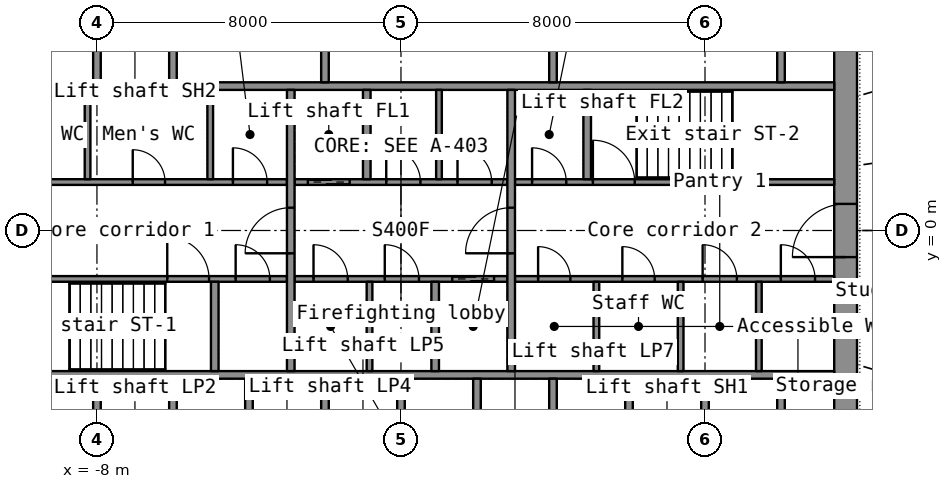
"""IFC4 building model, lengths in metres.
Left out: names, types, materials, properties, quantities, classifications, styles, units other than length and angle.
Written with IfcOpenShell. Run it as: python <this file> out.ifc"""

import sys

from ifc_helpers import new_model, si_unit, direction, frame, frame_2d, origin, place, context, subcontext, project, spatial, rectangle, extrude, element, fill, save


model = new_model("IFC4")
c1 = context("Model", 3, precision=1e-05, world=origin(), true_north=direction((0.0, 1.0)))
c2 = subcontext(c1, "Body", "Model", "MODEL_VIEW")
j1 = project(units=[si_unit("LENGTHUNIT", "METRE"), si_unit("PLANEANGLEUNIT", "RADIAN")], contexts=[c1])
p1 = place(None, origin())
s1 = spatial("IfcSite", under=j1, at=p1, CompositionType="ELEMENT")
p2 = place(p1, origin())
s2 = spatial("IfcBuilding", under=s1, at=p2, CompositionType="ELEMENT")
p3 = place(p2, frame((0.0, 0.0, 7.0)))
s3 = spatial("IfcBuildingStorey", under=s2, at=p3, CompositionType="ELEMENT", Elevation=7.0)
p4 = place(p3, frame((11.7, -7.2, 0.0), z_axis=(0.0, 0.0, 1.0), x_axis=(0.0, 1.0, 0.0)))
e1 = element("IfcWall", 1, at=p4, inside=s3, PredefinedType="SHEAR", context=c2, shape_type="SweptSolid", body=[
    extrude(rectangle(XDim=14.4, YDim=0.6, at=frame_2d((7.2, 0.0))), origin(), (0.0, 0.0, 1.0), 6.1),
])
p5 = place(p4, frame((6.5, 0.0, 0.0)))
e2 = element("IfcOpeningElement", 2, at=p5, cuts=e1, PredefinedType="OPENING", context=c2, shape_type="SweptSolid", body=[
    extrude(rectangle(XDim=1.4, YDim=2.2, at=frame_2d((0.7, 1.1))), frame((0.0, 0.31, 0.0), z_axis=(0.0, -1.0, 0.0), x_axis=(1.0, 0.0, 0.0)), (0.0, 0.0, 1.0), 0.62),
])
for number, where, z_axis, x_axis in (
    (3, (-11.4, -3.8, 0.0), (0.0, 0.0, 1.0), (1.0, 0.0, 0.0)),
    (4, (-11.4, 3.8, 0.0), (0.0, 0.0, 1.0), (1.0, 0.0, 0.0)),
):
    element("IfcWall", number, at=place(p3, frame(where, z_axis=z_axis, x_axis=x_axis)), inside=s3, PredefinedType="SHEAR", context=c2, shape_type="SweptSolid", body=[
        extrude(rectangle(XDim=22.8, YDim=0.2, at=frame_2d((11.4, 0.0))), origin(), (0.0, 0.0, 1.0), 6.1),
    ])
for number, where, z_axis, x_axis in (
    (5, (-8.0, -6.6, 0.0), (0.0, 0.0, 1.0), (0.0, 1.0, 0.0)),
    (6, (-6.0, -6.6, 0.0), (0.0, 0.0, 1.0), (0.0, 1.0, 0.0)),
    (7, (-4.0, -6.6, 0.0), (0.0, 0.0, 1.0), (0.0, 1.0, 0.0)),
    (8, (-2.0, -6.6, 0.0), (0.0, 0.0, 1.0), (0.0, 1.0, 0.0)),
    (9, (0.0, -6.6, 0.0), (0.0, 0.0, 1.0), (0.0, 1.0, 0.0)),
    (10, (2.0, -6.6, 0.0), (0.0, 0.0, 1.0), (0.0, 1.0, 0.0)),
    (11, (4.0, -6.6, 0.0), (0.0, 0.0, 1.0), (0.0, 1.0, 0.0)),
    (12, (6.0, -6.6, 0.0), (0.0, 0.0, 1.0), (0.0, 1.0, 0.0)),
    (13, (8.0, -6.6, 0.0), (0.0, 0.0, 1.0), (0.0, 1.0, 0.0)),
    (14, (10.0, -6.6, 0.0), (0.0, 0.0, 1.0), (0.0, 1.0, 0.0)),
    (15, (-8.0, 3.9, 0.0), (0.0, 0.0, 1.0), (0.0, 1.0, 0.0)),
    (16, (-6.0, 3.9, 0.0), (0.0, 0.0, 1.0), (0.0, 1.0, 0.0)),
    (17, (10.0, 3.9, 0.0), (0.0, 0.0, 1.0), (0.0, 1.0, 0.0)),
):
    element("IfcWall", number, at=place(p3, frame(where, z_axis=z_axis, x_axis=x_axis)), inside=s3, PredefinedType="SHEAR", context=c2, shape_type="SweptSolid", body=[
        extrude(rectangle(XDim=2.7, YDim=0.2, at=frame_2d((1.35, 0.0))), origin(), (0.0, 0.0, 1.0), 6.1),
    ])
for number, where, z_axis, x_axis in (
    (18, (-2.0, 3.9, 0.0), (0.0, 0.0, 1.0), (0.0, 1.0, 0.0)),
    (19, (4.0, 3.9, 0.0), (0.0, 0.0, 1.0), (0.0, 1.0, 0.0)),
):
    element("IfcWall", number, at=place(p3, frame(where, z_axis=z_axis, x_axis=x_axis)), inside=s3, PredefinedType="PARTITIONING", context=c2, shape_type="SweptSolid", body=[
        extrude(rectangle(XDim=2.7, YDim=0.2, at=frame_2d((1.35, 0.0))), origin(), (0.0, 0.0, 1.0), 6.1),
    ])
p6 = place(p3, frame((-11.4, -1.275, 0.0), z_axis=(0.0, 0.0, 1.0), x_axis=(1.0, 0.0, 0.0)))
e20 = element("IfcWall", 20, at=p6, inside=s3, PredefinedType="SHEAR", context=c2, shape_type="SweptSolid", body=[
    extrude(rectangle(XDim=8.4, YDim=0.15, at=frame_2d((4.2, 0.0))), origin(), (0.0, 0.0, 1.0), 6.1),
])
p7 = place(p6, frame((5.25, 0.0, 0.0)))
e21 = element("IfcOpeningElement", 21, at=p7, cuts=e20, PredefinedType="OPENING", context=c2, shape_type="SweptSolid", body=[
    extrude(rectangle(XDim=1.1, YDim=2.15, at=frame_2d((0.55, 1.075))), frame((0.0, 0.085, 0.0), z_axis=(0.0, -1.0, 0.0), x_axis=(1.0, 0.0, 0.0)), (0.0, 0.0, 1.0), 0.17),
])
p8 = place(p6, frame((7.05, 0.0, 0.0)))
e22 = element("IfcOpeningElement", 22, at=p8, cuts=e20, PredefinedType="OPENING", context=c2, shape_type="SweptSolid", body=[
    extrude(rectangle(XDim=0.9, YDim=2.1, at=frame_2d((0.45, 1.05))), frame((0.0, 0.085, 0.0), z_axis=(0.0, -1.0, 0.0), x_axis=(1.0, 0.0, 0.0)), (0.0, 0.0, 1.0), 0.17),
])
p9 = place(p3, frame((-2.8, -1.275, 0.0), z_axis=(0.0, 0.0, 1.0), x_axis=(1.0, 0.0, 0.0)))
e23 = element("IfcWall", 23, at=p9, inside=s3, PredefinedType="SHEAR", context=c2, shape_type="SweptSolid", body=[
    extrude(rectangle(XDim=5.6, YDim=0.15, at=frame_2d((2.8, 0.0))), origin(), (0.0, 0.0, 1.0), 6.1),
])
p10 = place(p9, frame((4.15, 0.0, 0.0)))
e24 = element("IfcOpeningElement", 24, at=p10, cuts=e23, PredefinedType="OPENING", context=c2, shape_type="SweptSolid", body=[
    extrude(rectangle(XDim=1.1, YDim=2.2, at=frame_2d((0.55, 1.1))), frame((0.0, 0.085, 0.0), z_axis=(0.0, -1.0, 0.0), x_axis=(1.0, 0.0, 0.0)), (0.0, 0.0, 1.0), 0.17),
])
p11 = place(p9, frame((0.499, 0.0, 0.0)))
e25 = element("IfcOpeningElement", 25, at=p11, cuts=e23, PredefinedType="OPENING", context=c2, shape_type="SweptSolid", body=[
    extrude(rectangle(XDim=0.9, YDim=2.1, at=frame_2d((0.45, 1.05))), frame((0.0, 0.085, 0.0), z_axis=(0.0, -1.0, 0.0), x_axis=(1.0, 0.0, 0.0)), (0.0, 0.0, 1.0), 0.17),
])
p12 = place(p9, frame((2.374, 0.0, 0.0)))
e26 = element("IfcOpeningElement", 26, at=p12, cuts=e23, PredefinedType="OPENING", context=c2, shape_type="SweptSolid", body=[
    extrude(rectangle(XDim=0.9, YDim=2.1, at=frame_2d((0.45, 1.05))), frame((0.0, 0.085, 0.0), z_axis=(0.0, -1.0, 0.0), x_axis=(1.0, 0.0, 0.0)), (0.0, 0.0, 1.0), 0.17),
])
p13 = place(p3, frame((3.0, -1.275, 0.0), z_axis=(0.0, 0.0, 1.0), x_axis=(1.0, 0.0, 0.0)))
e27 = element("IfcWall", 27, at=p13, inside=s3, PredefinedType="PARTITIONING", context=c2, shape_type="SweptSolid", body=[
    extrude(rectangle(XDim=8.4, YDim=0.15, at=frame_2d((4.2, 0.0))), origin(), (0.0, 0.0, 1.0), 6.1),
])
p14 = place(p13, frame((0.608, 0.0, 0.0)))
e28 = element("IfcOpeningElement", 28, at=p14, cuts=e27, PredefinedType="OPENING", context=c2, shape_type="SweptSolid", body=[
    extrude(rectangle(XDim=0.85, YDim=2.1, at=frame_2d((0.425, 1.05))), frame((0.0, 0.085, 0.0), z_axis=(0.0, -1.0, 0.0), x_axis=(1.0, 0.0, 0.0)), (0.0, 0.0, 1.0), 0.17),
])
p15 = place(p13, frame((2.825, 0.0, 0.0)))
e29 = element("IfcOpeningElement", 29, at=p15, cuts=e27, PredefinedType="OPENING", context=c2, shape_type="SweptSolid", body=[
    extrude(rectangle(XDim=0.85, YDim=2.1, at=frame_2d((0.425, 1.05))), frame((0.0, 0.085, 0.0), z_axis=(0.0, -1.0, 0.0), x_axis=(1.0, 0.0, 0.0)), (0.0, 0.0, 1.0), 0.17),
])
p16 = place(p13, frame((4.938, 0.0, 0.0)))
e30 = element("IfcOpeningElement", 30, at=p16, cuts=e27, PredefinedType="OPENING", context=c2, shape_type="SweptSolid", body=[
    extrude(rectangle(XDim=0.9, YDim=2.1, at=frame_2d((0.45, 1.05))), frame((0.0, 0.085, 0.0), z_axis=(0.0, -1.0, 0.0), x_axis=(1.0, 0.0, 0.0)), (0.0, 0.0, 1.0), 0.17),
])
p17 = place(p13, frame((6.996, 0.0, 0.0)))
e31 = element("IfcOpeningElement", 31, at=p17, cuts=e27, PredefinedType="OPENING", context=c2, shape_type="SweptSolid", body=[
    extrude(rectangle(XDim=0.9, YDim=2.1, at=frame_2d((0.45, 1.05))), frame((0.0, 0.085, 0.0), z_axis=(0.0, -1.0, 0.0), x_axis=(1.0, 0.0, 0.0)), (0.0, 0.0, 1.0), 0.17),
])
p18 = place(p3, frame((-11.4, 1.275, 0.0), z_axis=(0.0, 0.0, 1.0), x_axis=(1.0, 0.0, 0.0)))
e32 = element("IfcWall", 32, at=p18, inside=s3, PredefinedType="PARTITIONING", context=c2, shape_type="SweptSolid", body=[
    extrude(rectangle(XDim=8.4, YDim=0.15, at=frame_2d((4.2, 0.0))), origin(), (0.0, 0.0, 1.0), 6.1),
])
p19 = place(p18, frame((1.114, 0.0, 0.0)))
e33 = element("IfcOpeningElement", 33, at=p19, cuts=e32, PredefinedType="OPENING", context=c2, shape_type="SweptSolid", body=[
    extrude(rectangle(XDim=0.85, YDim=2.1, at=frame_2d((0.425, 1.05))), frame((0.0, 0.085, 0.0), z_axis=(0.0, -1.0, 0.0), x_axis=(1.0, 0.0, 0.0)), (0.0, 0.0, 1.0), 0.17),
])
p20 = place(p18, frame((4.342, 0.0, 0.0)))
e34 = element("IfcOpeningElement", 34, at=p20, cuts=e32, PredefinedType="OPENING", context=c2, shape_type="SweptSolid", body=[
    extrude(rectangle(XDim=0.85, YDim=2.1, at=frame_2d((0.425, 1.05))), frame((0.0, 0.085, 0.0), z_axis=(0.0, -1.0, 0.0), x_axis=(1.0, 0.0, 0.0)), (0.0, 0.0, 1.0), 0.17),
])
p21 = place(p18, frame((6.978, 0.0, 0.0)))
e35 = element("IfcOpeningElement", 35, at=p21, cuts=e32, PredefinedType="OPENING", context=c2, shape_type="SweptSolid", body=[
    extrude(rectangle(XDim=0.9, YDim=2.1, at=frame_2d((0.45, 1.05))), frame((0.0, 0.085, 0.0), z_axis=(0.0, -1.0, 0.0), x_axis=(1.0, 0.0, 0.0)), (0.0, 0.0, 1.0), 0.17),
])
p22 = place(p3, frame((-2.8, 1.275, 0.0), z_axis=(0.0, 0.0, 1.0), x_axis=(1.0, 0.0, 0.0)))
e36 = element("IfcWall", 36, at=p22, inside=s3, PredefinedType="SHEAR", context=c2, shape_type="SweptSolid", body=[
    extrude(rectangle(XDim=5.6, YDim=0.15, at=frame_2d((2.8, 0.0))), origin(), (0.0, 0.0, 1.0), 6.1),
])
p23 = place(p22, frame((0.35, 0.0, 0.0)))
e37 = element("IfcOpeningElement", 37, at=p23, cuts=e36, PredefinedType="OPENING", context=c2, shape_type="SweptSolid", body=[
    extrude(rectangle(XDim=1.1, YDim=2.2, at=frame_2d((0.55, 1.1))), frame((0.0, 0.085, 0.0), z_axis=(0.0, -1.0, 0.0), x_axis=(1.0, 0.0, 0.0)), (0.0, 0.0, 1.0), 0.17),
])
p24 = place(p22, frame((2.413, 0.0, 0.0)))
e38 = element("IfcOpeningElement", 38, at=p24, cuts=e36, PredefinedType="OPENING", context=c2, shape_type="SweptSolid", body=[
    extrude(rectangle(XDim=0.9, YDim=2.1, at=frame_2d((0.45, 1.05))), frame((0.0, 0.085, 0.0), z_axis=(0.0, -1.0, 0.0), x_axis=(1.0, 0.0, 0.0)), (0.0, 0.0, 1.0), 0.17),
])
p25 = place(p22, frame((4.288, 0.0, 0.0)))
e39 = element("IfcOpeningElement", 39, at=p25, cuts=e36, PredefinedType="OPENING", context=c2, shape_type="SweptSolid", body=[
    extrude(rectangle(XDim=0.9, YDim=2.1, at=frame_2d((0.45, 1.05))), frame((0.0, 0.085, 0.0), z_axis=(0.0, -1.0, 0.0), x_axis=(1.0, 0.0, 0.0)), (0.0, 0.0, 1.0), 0.17),
])
p26 = place(p3, frame((3.0, 1.275, 0.0), z_axis=(0.0, 0.0, 1.0), x_axis=(1.0, 0.0, 0.0)))
e40 = element("IfcWall", 40, at=p26, inside=s3, PredefinedType="SHEAR", context=c2, shape_type="SweptSolid", body=[
    extrude(rectangle(XDim=8.4, YDim=0.15, at=frame_2d((4.2, 0.0))), origin(), (0.0, 0.0, 1.0), 6.1),
])
p27 = place(p26, frame((2.05, 0.0, 0.0)))
e41 = element("IfcOpeningElement", 41, at=p27, cuts=e40, PredefinedType="OPENING", context=c2, shape_type="SweptSolid", body=[
    extrude(rectangle(XDim=1.1, YDim=2.15, at=frame_2d((0.55, 1.075))), frame((0.0, 0.085, 0.0), z_axis=(0.0, -1.0, 0.0), x_axis=(1.0, 0.0, 0.0)), (0.0, 0.0, 1.0), 0.17),
])
p28 = place(p26, frame((0.45, 0.0, 0.0)))
e42 = element("IfcOpeningElement", 42, at=p28, cuts=e40, PredefinedType="OPENING", context=c2, shape_type="SweptSolid", body=[
    extrude(rectangle(XDim=0.9, YDim=2.1, at=frame_2d((0.45, 1.05))), frame((0.0, 0.085, 0.0), z_axis=(0.0, -1.0, 0.0), x_axis=(1.0, 0.0, 0.0)), (0.0, 0.0, 1.0), 0.17),
])
p29 = place(p3, frame((-2.9, -3.7, 0.0), z_axis=(0.0, 0.0, 1.0), x_axis=(0.0, 1.0, 0.0)))
e43 = element("IfcWall", 43, at=p29, inside=s3, PredefinedType="SHEAR", context=c2, shape_type="SweptSolid", body=[
    extrude(rectangle(XDim=7.4, YDim=0.2, at=frame_2d((3.7, 0.0))), origin(), (0.0, 0.0, 1.0), 6.1),
])
p30 = place(p29, frame((3.1, 0.0, 0.0)))
e44 = element("IfcOpeningElement", 44, at=p30, cuts=e43, PredefinedType="OPENING", context=c2, shape_type="SweptSolid", body=[
    extrude(rectangle(XDim=1.2, YDim=2.2, at=frame_2d((0.6, 1.1))), frame((0.0, 0.11, 0.0), z_axis=(0.0, -1.0, 0.0), x_axis=(1.0, 0.0, 0.0)), (0.0, 0.0, 1.0), 0.22),
])
p31 = place(p3, frame((2.9, -3.7, 0.0), z_axis=(0.0, 0.0, 1.0), x_axis=(0.0, 1.0, 0.0)))
e45 = element("IfcWall", 45, at=p31, inside=s3, PredefinedType="SHEAR", context=c2, shape_type="SweptSolid", body=[
    extrude(rectangle(XDim=7.4, YDim=0.2, at=frame_2d((3.7, 0.0))), origin(), (0.0, 0.0, 1.0), 6.1),
])
p32 = place(p31, frame((3.1, 0.0, 0.0)))
e46 = element("IfcOpeningElement", 46, at=p32, cuts=e45, PredefinedType="OPENING", context=c2, shape_type="SweptSolid", body=[
    extrude(rectangle(XDim=1.2, YDim=2.2, at=frame_2d((0.6, 1.1))), frame((0.0, 0.11, 0.0), z_axis=(0.0, -1.0, 0.0), x_axis=(1.0, 0.0, 0.0)), (0.0, 0.0, 1.0), 0.22),
])
for number, where, z_axis, x_axis in (
    (47, (-0.9, 1.35, 0.0), (0.0, 0.0, 1.0), (0.0, 1.0, 0.0)),
    (48, (0.9, -3.7, 0.0), (0.0, 0.0, 1.0), (0.0, 1.0, 0.0)),
    (49, (-4.9, -3.7, 0.0), (0.0, 0.0, 1.0), (0.0, 1.0, 0.0)),
    (50, (4.9, 1.35, 0.0), (0.0, 0.0, 1.0), (0.0, 1.0, 0.0)),
):
    element("IfcWall", number, at=place(p3, frame(where, z_axis=z_axis, x_axis=x_axis)), inside=s3, PredefinedType="SHEAR", context=c2, shape_type="SweptSolid", body=[
        extrude(rectangle(XDim=2.35, YDim=0.2, at=frame_2d((1.175, 0.0))), origin(), (0.0, 0.0, 1.0), 6.1),
    ])
for number, where, z_axis, x_axis in (
    (51, (-8.247, 1.35, 0.0), (0.0, 0.0, 1.0), (0.0, 1.0, 0.0)),
    (52, (-5.019, 1.35, 0.0), (0.0, 0.0, 1.0), (0.0, 1.0, 0.0)),
    (53, (5.142, -3.7, 0.0), (0.0, 0.0, 1.0), (0.0, 1.0, 0.0)),
    (54, (7.359, -3.7, 0.0), (0.0, 0.0, 1.0), (0.0, 1.0, 0.0)),
    (55, (9.417, -3.7, 0.0), (0.0, 0.0, 1.0), (0.0, 1.0, 0.0)),
    (56, (1.0, 1.35, 0.0), (0.0, 0.0, 1.0), (0.0, 1.0, 0.0)),
    (57, (-0.827, -3.7, 0.0), (0.0, 0.0, 1.0), (0.0, 1.0, 0.0)),
):
    element("IfcWall", number, at=place(p3, frame(where, z_axis=z_axis, x_axis=x_axis)), inside=s3, PredefinedType="PARTITIONING", context=c2, shape_type="SweptSolid", body=[
        extrude(rectangle(XDim=2.35, YDim=0.15, at=frame_2d((1.175, 0.0))), origin(), (0.0, 0.0, 1.0), 6.1),
    ])
p33 = place(p5, origin())
e58 = element("IfcDoor", 58, at=p33, inside=s3, OperationType="DOUBLE_DOOR_SINGLE_SWING", PredefinedType="DOOR", context=c2, shape_type="SweptSolid", body=[
    extrude(rectangle(XDim=1.4, YDim=2.2, at=frame_2d((0.7, 1.1))), frame((0.0, 0.025, 0.0), z_axis=(0.0, -1.0, 0.0), x_axis=(1.0, 0.0, 0.0)), (0.0, 0.0, 1.0), 0.05),
])
fill(e2, e58)
p34 = place(p30, origin())
e59 = element("IfcDoor", 59, at=p34, inside=s3, OperationType="SINGLE_SWING_LEFT", PredefinedType="DOOR", context=c2, shape_type="SweptSolid", body=[
    extrude(rectangle(XDim=1.2, YDim=2.2, at=frame_2d((0.6, 1.1))), frame((0.0, 0.025, 0.0), z_axis=(0.0, -1.0, 0.0), x_axis=(1.0, 0.0, 0.0)), (0.0, 0.0, 1.0), 0.05),
])
fill(e44, e59)
p35 = place(p32, origin())
e60 = element("IfcDoor", 60, at=p35, inside=s3, OperationType="SINGLE_SWING_LEFT", PredefinedType="DOOR", context=c2, shape_type="SweptSolid", body=[
    extrude(rectangle(XDim=1.2, YDim=2.2, at=frame_2d((0.6, 1.1))), frame((0.0, 0.025, 0.0), z_axis=(0.0, -1.0, 0.0), x_axis=(1.0, 0.0, 0.0)), (0.0, 0.0, 1.0), 0.05),
])
fill(e46, e60)
p36 = place(p23, origin())
e61 = element("IfcDoor", 61, at=p36, inside=s3, OperationType="DOUBLE_DOOR_SLIDING", PredefinedType="DOOR", context=c2, shape_type="SweptSolid", body=[
    extrude(rectangle(XDim=1.1, YDim=2.2, at=frame_2d((0.55, 1.1))), frame((0.0, 0.025, 0.0), z_axis=(0.0, -1.0, 0.0), x_axis=(1.0, 0.0, 0.0)), (0.0, 0.0, 1.0), 0.05),
])
fill(e37, e61)
p37 = place(p10, origin())
e62 = element("IfcDoor", 62, at=p37, inside=s3, OperationType="DOUBLE_DOOR_SLIDING", PredefinedType="DOOR", context=c2, shape_type="SweptSolid", body=[
    extrude(rectangle(XDim=1.1, YDim=2.2, at=frame_2d((0.55, 1.1))), frame((0.0, 0.025, 0.0), z_axis=(0.0, -1.0, 0.0), x_axis=(1.0, 0.0, 0.0)), (0.0, 0.0, 1.0), 0.05),
])
fill(e24, e62)
p38 = place(p7, origin())
e63 = element("IfcDoor", 63, at=p38, inside=s3, OperationType="SINGLE_SWING_LEFT", PredefinedType="DOOR", context=c2, shape_type="SweptSolid", body=[
    extrude(rectangle(XDim=1.1, YDim=2.15, at=frame_2d((0.55, 1.075))), frame((0.0, 0.025, 0.0), z_axis=(0.0, -1.0, 0.0), x_axis=(1.0, 0.0, 0.0)), (0.0, 0.0, 1.0), 0.05),
])
fill(e21, e63)
p39 = place(p27, origin())
e64 = element("IfcDoor", 64, at=p39, inside=s3, OperationType="SINGLE_SWING_LEFT", PredefinedType="DOOR", context=c2, shape_type="SweptSolid", body=[
    extrude(rectangle(XDim=1.1, YDim=2.15, at=frame_2d((0.55, 1.075))), frame((0.0, 0.025, 0.0), z_axis=(0.0, -1.0, 0.0), x_axis=(1.0, 0.0, 0.0)), (0.0, 0.0, 1.0), 0.05),
])
fill(e41, e64)
p40 = place(p20, origin())
e65 = element("IfcDoor", 65, at=p40, inside=s3, OperationType="SINGLE_SWING_LEFT", PredefinedType="DOOR", context=c2, shape_type="SweptSolid", body=[
    extrude(rectangle(XDim=0.85, YDim=2.1, at=frame_2d((0.425, 1.05))), frame((0.0, 0.025, 0.0), z_axis=(0.0, -1.0, 0.0), x_axis=(1.0, 0.0, 0.0)), (0.0, 0.0, 1.0), 0.05),
])
fill(e34, e65)
p41 = place(p21, origin())
e66 = element("IfcDoor", 66, at=p41, inside=s3, OperationType="SINGLE_SWING_LEFT", PredefinedType="DOOR", context=c2, shape_type="SweptSolid", body=[
    extrude(rectangle(XDim=0.9, YDim=2.1, at=frame_2d((0.45, 1.05))), frame((0.0, 0.025, 0.0), z_axis=(0.0, -1.0, 0.0), x_axis=(1.0, 0.0, 0.0)), (0.0, 0.0, 1.0), 0.05),
])
fill(e35, e66)
p42 = place(p14, origin())
e67 = element("IfcDoor", 67, at=p42, inside=s3, OperationType="SINGLE_SWING_LEFT", PredefinedType="DOOR", context=c2, shape_type="SweptSolid", body=[
    extrude(rectangle(XDim=0.85, YDim=2.1, at=frame_2d((0.425, 1.05))), frame((0.0, 0.025, 0.0), z_axis=(0.0, -1.0, 0.0), x_axis=(1.0, 0.0, 0.0)), (0.0, 0.0, 1.0), 0.05),
])
fill(e28, e67)
p43 = place(p15, origin())
e68 = element("IfcDoor", 68, at=p43, inside=s3, OperationType="SINGLE_SWING_LEFT", PredefinedType="DOOR", context=c2, shape_type="SweptSolid", body=[
    extrude(rectangle(XDim=0.85, YDim=2.1, at=frame_2d((0.425, 1.05))), frame((0.0, 0.025, 0.0), z_axis=(0.0, -1.0, 0.0), x_axis=(1.0, 0.0, 0.0)), (0.0, 0.0, 1.0), 0.05),
])
fill(e29, e68)
p44 = place(p16, origin())
e69 = element("IfcDoor", 69, at=p44, inside=s3, OperationType="SINGLE_SWING_LEFT", PredefinedType="DOOR", context=c2, shape_type="SweptSolid", body=[
    extrude(rectangle(XDim=0.9, YDim=2.1, at=frame_2d((0.45, 1.05))), frame((0.0, 0.025, 0.0), z_axis=(0.0, -1.0, 0.0), x_axis=(1.0, 0.0, 0.0)), (0.0, 0.0, 1.0), 0.05),
])
fill(e30, e69)
p45 = place(p17, origin())
e70 = element("IfcDoor", 70, at=p45, inside=s3, OperationType="SINGLE_SWING_LEFT", PredefinedType="DOOR", context=c2, shape_type="SweptSolid", body=[
    extrude(rectangle(XDim=0.9, YDim=2.1, at=frame_2d((0.45, 1.05))), frame((0.0, 0.025, 0.0), z_axis=(0.0, -1.0, 0.0), x_axis=(1.0, 0.0, 0.0)), (0.0, 0.0, 1.0), 0.05),
])
fill(e31, e70)
p46 = place(p24, origin())
e71 = element("IfcDoor", 71, at=p46, inside=s3, OperationType="SINGLE_SWING_LEFT", PredefinedType="DOOR", context=c2, shape_type="SweptSolid", body=[
    extrude(rectangle(XDim=0.9, YDim=2.1, at=frame_2d((0.45, 1.05))), frame((0.0, 0.025, 0.0), z_axis=(0.0, -1.0, 0.0), x_axis=(1.0, 0.0, 0.0)), (0.0, 0.0, 1.0), 0.05),
])
fill(e38, e71)
p47 = place(p25, origin())
e72 = element("IfcDoor", 72, at=p47, inside=s3, OperationType="SINGLE_SWING_LEFT", PredefinedType="DOOR", context=c2, shape_type="SweptSolid", body=[
    extrude(rectangle(XDim=0.9, YDim=2.1, at=frame_2d((0.45, 1.05))), frame((0.0, 0.025, 0.0), z_axis=(0.0, -1.0, 0.0), x_axis=(1.0, 0.0, 0.0)), (0.0, 0.0, 1.0), 0.05),
])
fill(e39, e72)
p48 = place(p11, origin())
e73 = element("IfcDoor", 73, at=p48, inside=s3, OperationType="SINGLE_SWING_LEFT", PredefinedType="DOOR", context=c2, shape_type="SweptSolid", body=[
    extrude(rectangle(XDim=0.9, YDim=2.1, at=frame_2d((0.45, 1.05))), frame((0.0, 0.025, 0.0), z_axis=(0.0, -1.0, 0.0), x_axis=(1.0, 0.0, 0.0)), (0.0, 0.0, 1.0), 0.05),
])
fill(e25, e73)
p49 = place(p12, origin())
e74 = element("IfcDoor", 74, at=p49, inside=s3, OperationType="SINGLE_SWING_LEFT", PredefinedType="DOOR", context=c2, shape_type="SweptSolid", body=[
    extrude(rectangle(XDim=0.9, YDim=2.1, at=frame_2d((0.45, 1.05))), frame((0.0, 0.025, 0.0), z_axis=(0.0, -1.0, 0.0), x_axis=(1.0, 0.0, 0.0)), (0.0, 0.0, 1.0), 0.05),
])
fill(e26, e74)
p50 = place(p28, origin())
e75 = element("IfcDoor", 75, at=p50, inside=s3, OperationType="SINGLE_SWING_LEFT", PredefinedType="DOOR", context=c2, shape_type="SweptSolid", body=[
    extrude(rectangle(XDim=0.9, YDim=2.1, at=frame_2d((0.45, 1.05))), frame((0.0, 0.025, 0.0), z_axis=(0.0, -1.0, 0.0), x_axis=(1.0, 0.0, 0.0)), (0.0, 0.0, 1.0), 0.05),
])
fill(e42, e75)
p51 = place(p8, origin())
e76 = element("IfcDoor", 76, at=p51, inside=s3, OperationType="SINGLE_SWING_LEFT", PredefinedType="DOOR", context=c2, shape_type="SweptSolid", body=[
    extrude(rectangle(XDim=0.9, YDim=2.1, at=frame_2d((0.45, 1.05))), frame((0.0, 0.025, 0.0), z_axis=(0.0, -1.0, 0.0), x_axis=(1.0, 0.0, 0.0)), (0.0, 0.0, 1.0), 0.05),
])
fill(e22, e76)
save(model, sys.argv[1])
